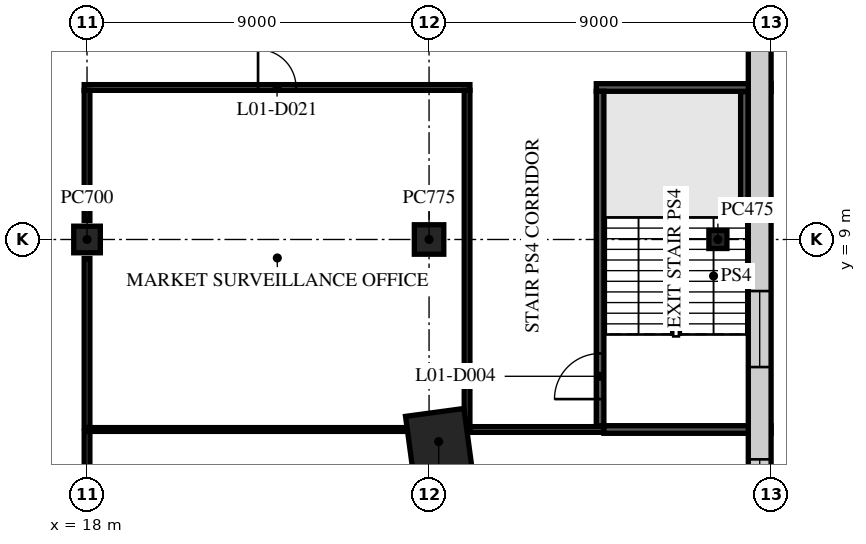
"""IFC4 building model, lengths in metres.
Left out: names, types, materials, properties, quantities, classifications, styles, units other than length and angle.
Written with IfcOpenShell. Run it as: python <this file> out.ifc"""

import sys

from ifc_helpers import new_model, si_unit, direction, frame, frame_2d, origin, origin_2d, place, context, subcontext, project, spatial, rectangle, extrude, element, fill, save


model = new_model("IFC4")
c1 = context("Model", 3, precision=1e-05, world=origin(), true_north=direction((0.0, 1.0)))
c2 = subcontext(c1, "Body", "Model", "MODEL_VIEW")
j1 = project(units=[si_unit("LENGTHUNIT", "METRE"), si_unit("PLANEANGLEUNIT", "RADIAN")], contexts=[c1])
p1 = place(None, origin())
s1 = spatial("IfcSite", under=j1, at=p1, CompositionType="ELEMENT")
p2 = place(p1, origin())
s2 = spatial("IfcBuilding", under=s1, at=p2, CompositionType="ELEMENT")
p3 = place(p2, frame((0.0, 0.0, 4.5)))
s3 = spatial("IfcBuildingStorey", under=s2, at=p3, CompositionType="ELEMENT", Elevation=4.5)
p4 = place(p3, frame((18.0, 9.0, 0.0), z_axis=(0.0, 0.0, 1.0), x_axis=(1.0, 0.0, 0.0)))
e1 = element("IfcColumn", 1, at=p4, inside=s3, PredefinedType="COLUMN", context=c2, shape_type="SweptSolid", body=[
    extrude(rectangle(XDim=0.7, YDim=0.7, at=origin_2d()), origin(), (0.0, 0.0, 1.0), 4.5),
])
p5 = place(p3, frame((27.0, 9.0, 0.0), z_axis=(0.0, 0.0, 1.0), x_axis=(1.0, 0.0, 0.0)))
e2 = element("IfcColumn", 2, at=p5, inside=s3, PredefinedType="COLUMN", context=c2, shape_type="SweptSolid", body=[
    extrude(rectangle(XDim=0.775, YDim=0.775, at=origin_2d()), origin(), (0.0, 0.0, 1.0), 4.5),
])
p6 = place(p3, frame((34.6, 9.0, 0.0), z_axis=(0.0, 0.0, 1.0), x_axis=(1.0, 0.0, 0.0)))
e3 = element("IfcColumn", 3, at=p6, inside=s3, PredefinedType="COLUMN", context=c2, shape_type="SweptSolid", body=[
    extrude(rectangle(XDim=0.475, YDim=0.475, at=origin_2d()), origin(), (0.0, 0.0, 1.0), 4.5),
])
p7 = place(p3, frame((27.253, 3.681, 0.0), z_axis=(0.0, 0.0, 1.0), x_axis=(0.991001197216, 0.133853005627, 0.0)))
e4 = element("IfcColumn", 4, at=p7, inside=s3, PredefinedType="COLUMN", context=c2, shape_type="SweptSolid", body=[
    extrude(rectangle(XDim=1.55, YDim=1.55, at=origin_2d()), origin(), (0.0, 0.0, 1.0), 4.5),
])
p8 = place(p3, frame((18.075, 4.0, 0.0), z_axis=(0.0, 0.0, 1.0), x_axis=(1.0, 0.0, 0.0)))
e5 = element("IfcWall", 5, at=p8, inside=s3, PredefinedType="PARTITIONING", context=c2, shape_type="SweptSolid", body=[
    extrude(rectangle(XDim=8.447, YDim=0.1, at=frame_2d((4.223, 0.0))), origin(), (0.0, 0.0, 1.0), 4.1),
])
p9 = place(p3, frame((28.075, 4.0, 0.0), z_axis=(0.0, 0.0, 1.0), x_axis=(1.0, 0.0, 0.0)))
e6 = element("IfcWall", 6, at=p9, inside=s3, PredefinedType="PARTITIONING", context=c2, shape_type="SweptSolid", body=[
    extrude(rectangle(XDim=3.525, YDim=0.15, at=frame_2d((1.763, 0.0))), origin(), (0.0, 0.0, 1.0), 4.1),
])
p10 = place(p3, frame((31.6, 4.0, 0.0), z_axis=(0.0, 0.0, 1.0), x_axis=(1.0, 0.0, 0.0)))
e7 = element("IfcWall", 7, at=p10, inside=s3, PredefinedType="PARTITIONING", context=c2, shape_type="SweptSolid", body=[
    extrude(rectangle(XDim=4.4, YDim=0.2, at=frame_2d((2.2, 0.0))), origin(), (0.0, 0.0, 1.0), 4.1),
])
p11 = place(p3, frame((17.925, 13.0, 0.0), z_axis=(0.0, 0.0, 1.0), x_axis=(1.0, 0.0, 0.0)))
e8 = element("IfcWall", 8, at=p11, inside=s3, PredefinedType="PARTITIONING", context=c2, shape_type="SweptSolid", body=[
    extrude(rectangle(XDim=10.15, YDim=0.15, at=frame_2d((5.075, 0.0))), origin(), (0.0, 0.0, 1.0), 4.1),
])
p12 = place(p11, frame((4.575, 0.0, 0.0)))
e9 = element("IfcOpeningElement", 9, at=p12, cuts=e8, PredefinedType="OPENING", context=c2, shape_type="SweptSolid", body=[
    extrude(rectangle(XDim=1.0, YDim=2.1, at=frame_2d((0.5, 1.05))), frame((0.0, 0.085, 0.0), z_axis=(0.0, -1.0, 0.0), x_axis=(1.0, 0.0, 0.0)), (0.0, 0.0, 1.0), 0.17),
])
p13 = place(p3, frame((31.4, 13.0, 0.0), z_axis=(0.0, 0.0, 1.0), x_axis=(1.0, 0.0, 0.0)))
e10 = element("IfcWall", 10, at=p13, inside=s3, PredefinedType="PARTITIONING", context=c2, shape_type="SweptSolid", body=[
    extrude(rectangle(XDim=4.6, YDim=0.2, at=frame_2d((2.3, 0.0))), origin(), (0.0, 0.0, 1.0), 4.1),
])
p14 = place(p3, frame((18.0, 0.5, 0.0), z_axis=(0.0, 0.0, 1.0), x_axis=(0.0, 1.0, 0.0)))
e11 = element("IfcWall", 11, at=p14, inside=s3, PredefinedType="PARTITIONING", context=c2, shape_type="SweptSolid", body=[
    extrude(rectangle(XDim=3.45, YDim=0.15, at=frame_2d((1.725, 0.0))), origin(), (0.0, 0.0, 1.0), 4.1),
])
p15 = place(p3, frame((18.0, 4.05, 0.0), z_axis=(0.0, 0.0, 1.0), x_axis=(0.0, 1.0, 0.0)))
e12 = element("IfcWall", 12, at=p15, inside=s3, PredefinedType="PARTITIONING", context=c2, shape_type="SweptSolid", body=[
    extrude(rectangle(XDim=4.45, YDim=0.15, at=frame_2d((2.225, 0.0))), origin(), (0.0, 0.0, 1.0), 4.1),
])
p16 = place(p3, frame((18.0, 9.5, 0.0), z_axis=(0.0, 0.0, 1.0), x_axis=(0.0, 1.0, 0.0)))
e13 = element("IfcWall", 13, at=p16, inside=s3, PredefinedType="PARTITIONING", context=c2, shape_type="SweptSolid", body=[
    extrude(rectangle(XDim=3.425, YDim=0.15, at=frame_2d((1.712, 0.0))), origin(), (0.0, 0.0, 1.0), 4.1),
])
p17 = place(p3, frame((28.0, 4.075, 0.0), z_axis=(0.0, 0.0, 1.0), x_axis=(0.0, 1.0, 0.0)))
e14 = element("IfcWall", 14, at=p17, inside=s3, PredefinedType="PARTITIONING", context=c2, shape_type="SweptSolid", body=[
    extrude(rectangle(XDim=8.85, YDim=0.15, at=frame_2d((4.425, 0.0))), origin(), (0.0, 0.0, 1.0), 4.1),
])
p18 = place(p3, frame((31.5, 4.1, 0.0), z_axis=(0.0, 0.0, 1.0), x_axis=(0.0, 1.0, 0.0)))
e15 = element("IfcWall", 15, at=p18, inside=s3, PredefinedType="PARTITIONING", context=c2, shape_type="SweptSolid", body=[
    extrude(rectangle(XDim=8.8, YDim=0.2, at=frame_2d((4.4, 0.0))), origin(), (0.0, 0.0, 1.0), 4.1),
])
p19 = place(p18, frame((0.7, 0.0, 0.0)))
e16 = element("IfcOpeningElement", 16, at=p19, cuts=e15, PredefinedType="OPENING", context=c2, shape_type="SweptSolid", body=[
    extrude(rectangle(XDim=1.2, YDim=2.1, at=frame_2d((0.6, 1.05))), frame((0.0, 0.11, 0.0), z_axis=(0.0, -1.0, 0.0), x_axis=(1.0, 0.0, 0.0)), (0.0, 0.0, 1.0), 0.22),
])
p20 = place(p3, frame((35.298, 9.581, 0.0), z_axis=(0.0, 0.0, 1.0), x_axis=(0.0, 1.0, 0.0)))
e17 = element("IfcWall", 17, at=p20, inside=s3, PredefinedType="PARTITIONING", context=c2, shape_type="SweptSolid", body=[
    extrude(rectangle(XDim=3.309, YDim=0.2, at=frame_2d((1.655, 0.0))), origin(), (0.0, 0.0, 1.0), 4.1),
])
p21 = place(p3, frame((35.7, -30.876, 0.0), z_axis=(0.0, 0.0, 1.0), x_axis=(0.0, 1.0, 0.0)))
e18 = element("IfcWall", 18, at=p21, inside=s3, PredefinedType="STANDARD", context=c2, shape_type="SweptSolid", body=[
    extrude(rectangle(XDim=61.751, YDim=0.6, at=frame_2d((30.876, 0.0))), origin(), (0.0, 0.0, 1.0), 4.1),
])
p22 = place(p21, frame((1.152, 0.0, 0.9)))
e19 = element("IfcOpeningElement", 19, at=p22, cuts=e18, PredefinedType="OPENING", context=c2, shape_type="SweptSolid", body=[
    extrude(rectangle(XDim=2.0, YDim=3.0, at=frame_2d((1.0, 1.5))), frame((0.0, 0.31, 0.0), z_axis=(0.0, -1.0, 0.0), x_axis=(1.0, 0.0, 0.0)), (0.0, 0.0, 1.0), 0.62),
])
p23 = place(p21, frame((5.519, 0.0, 0.9)))
e20 = element("IfcOpeningElement", 20, at=p23, cuts=e18, PredefinedType="OPENING", context=c2, shape_type="SweptSolid", body=[
    extrude(rectangle(XDim=2.0, YDim=3.0, at=frame_2d((1.0, 1.5))), frame((0.0, 0.31, 0.0), z_axis=(0.0, -1.0, 0.0), x_axis=(1.0, 0.0, 0.0)), (0.0, 0.0, 1.0), 0.62),
])
p24 = place(p21, frame((9.947, 0.0, 0.9)))
e21 = element("IfcOpeningElement", 21, at=p24, cuts=e18, PredefinedType="OPENING", context=c2, shape_type="SweptSolid", body=[
    extrude(rectangle(XDim=2.0, YDim=3.0, at=frame_2d((1.0, 1.5))), frame((0.0, 0.31, 0.0), z_axis=(0.0, -1.0, 0.0), x_axis=(1.0, 0.0, 0.0)), (0.0, 0.0, 1.0), 0.62),
])
p25 = place(p21, frame((14.376, 0.0, 0.9)))
e22 = element("IfcOpeningElement", 22, at=p25, cuts=e18, PredefinedType="OPENING", context=c2, shape_type="SweptSolid", body=[
    extrude(rectangle(XDim=2.0, YDim=3.0, at=frame_2d((1.0, 1.5))), frame((0.0, 0.31, 0.0), z_axis=(0.0, -1.0, 0.0), x_axis=(1.0, 0.0, 0.0)), (0.0, 0.0, 1.0), 0.62),
])
p26 = place(p21, frame((18.804, 0.0, 0.9)))
e23 = element("IfcOpeningElement", 23, at=p26, cuts=e18, PredefinedType="OPENING", context=c2, shape_type="SweptSolid", body=[
    extrude(rectangle(XDim=2.0, YDim=3.0, at=frame_2d((1.0, 1.5))), frame((0.0, 0.31, 0.0), z_axis=(0.0, -1.0, 0.0), x_axis=(1.0, 0.0, 0.0)), (0.0, 0.0, 1.0), 0.62),
])
p27 = place(p21, frame((23.233, 0.0, 0.9)))
e24 = element("IfcOpeningElement", 24, at=p27, cuts=e18, PredefinedType="OPENING", context=c2, shape_type="SweptSolid", body=[
    extrude(rectangle(XDim=2.0, YDim=3.0, at=frame_2d((1.0, 1.5))), frame((0.0, 0.31, 0.0), z_axis=(0.0, -1.0, 0.0), x_axis=(1.0, 0.0, 0.0)), (0.0, 0.0, 1.0), 0.62),
])
p28 = place(p21, frame((27.662, 0.0, 0.9)))
e25 = element("IfcOpeningElement", 25, at=p28, cuts=e18, PredefinedType="OPENING", context=c2, shape_type="SweptSolid", body=[
    extrude(rectangle(XDim=2.0, YDim=3.0, at=frame_2d((1.0, 1.5))), frame((0.0, 0.31, 0.0), z_axis=(0.0, -1.0, 0.0), x_axis=(1.0, 0.0, 0.0)), (0.0, 0.0, 1.0), 0.62),
])
p29 = place(p21, frame((32.09, 0.0, 0.9)))
e26 = element("IfcOpeningElement", 26, at=p29, cuts=e18, PredefinedType="OPENING", context=c2, shape_type="SweptSolid", body=[
    extrude(rectangle(XDim=2.0, YDim=3.0, at=frame_2d((1.0, 1.5))), frame((0.0, 0.31, 0.0), z_axis=(0.0, -1.0, 0.0), x_axis=(1.0, 0.0, 0.0)), (0.0, 0.0, 1.0), 0.62),
])
p30 = place(p21, frame((36.519, 0.0, 0.9)))
e27 = element("IfcOpeningElement", 27, at=p30, cuts=e18, PredefinedType="OPENING", context=c2, shape_type="SweptSolid", body=[
    extrude(rectangle(XDim=2.0, YDim=3.0, at=frame_2d((1.0, 1.5))), frame((0.0, 0.31, 0.0), z_axis=(0.0, -1.0, 0.0), x_axis=(1.0, 0.0, 0.0)), (0.0, 0.0, 1.0), 0.62),
])
p31 = place(p21, frame((45.376, 0.0, 0.9)))
e28 = element("IfcOpeningElement", 28, at=p31, cuts=e18, PredefinedType="OPENING", context=c2, shape_type="SweptSolid", body=[
    extrude(rectangle(XDim=2.0, YDim=3.0, at=frame_2d((1.0, 1.5))), frame((0.0, 0.31, 0.0), z_axis=(0.0, -1.0, 0.0), x_axis=(1.0, 0.0, 0.0)), (0.0, 0.0, 1.0), 0.62),
])
p32 = place(p21, frame((49.804, 0.0, 0.9)))
e29 = element("IfcOpeningElement", 29, at=p32, cuts=e18, PredefinedType="OPENING", context=c2, shape_type="SweptSolid", body=[
    extrude(rectangle(XDim=2.0, YDim=3.0, at=frame_2d((1.0, 1.5))), frame((0.0, 0.31, 0.0), z_axis=(0.0, -1.0, 0.0), x_axis=(1.0, 0.0, 0.0)), (0.0, 0.0, 1.0), 0.62),
])
p33 = place(p21, frame((58.599, 0.0, 0.9)))
e30 = element("IfcOpeningElement", 30, at=p33, cuts=e18, PredefinedType="OPENING", context=c2, shape_type="SweptSolid", body=[
    extrude(rectangle(XDim=2.0, YDim=3.0, at=frame_2d((1.0, 1.5))), frame((0.0, 0.31, 0.0), z_axis=(0.0, -1.0, 0.0), x_axis=(1.0, 0.0, 0.0)), (0.0, 0.0, 1.0), 0.62),
])
p34 = place(p19, frame((1.2, 0.0, 0.0), z_axis=(0.0, 0.0, 1.0), x_axis=(-1.0, 0.0, 0.0)))
e31 = element("IfcDoor", 31, at=p34, inside=s3, OperationType="SINGLE_SWING_RIGHT", PredefinedType="DOOR", context=c2, shape_type="SweptSolid", body=[
    extrude(rectangle(XDim=1.2, YDim=2.1, at=frame_2d((0.6, 1.05))), frame((0.0, 0.025, 0.0), z_axis=(0.0, -1.0, 0.0), x_axis=(1.0, 0.0, 0.0)), (0.0, 0.0, 1.0), 0.05),
])
fill(e16, e31)
p35 = place(p12, origin())
e32 = element("IfcDoor", 32, at=p35, inside=s3, OperationType="SINGLE_SWING_LEFT", PredefinedType="DOOR", context=c2, shape_type="SweptSolid", body=[
    extrude(rectangle(XDim=1.0, YDim=2.1, at=frame_2d((0.5, 1.05))), frame((0.0, 0.025, 0.0), z_axis=(0.0, -1.0, 0.0), x_axis=(1.0, 0.0, 0.0)), (0.0, 0.0, 1.0), 0.05),
])
fill(e9, e32)
p36 = place(p29, origin())
e33 = element("IfcWindow", 33, at=p36, inside=s3, PartitioningType="SINGLE_PANEL", PredefinedType="WINDOW", context=c2, shape_type="SweptSolid", body=[
    extrude(rectangle(XDim=2.0, YDim=3.0, at=frame_2d((1.0, 1.5))), frame((0.0, 0.03, 0.0), z_axis=(0.0, -1.0, 0.0), x_axis=(1.0, 0.0, 0.0)), (0.0, 0.0, 1.0), 0.06),
])
fill(e26, e33)
p37 = place(p30, origin())
e34 = element("IfcWindow", 34, at=p37, inside=s3, PartitioningType="SINGLE_PANEL", PredefinedType="WINDOW", context=c2, shape_type="SweptSolid", body=[
    extrude(rectangle(XDim=2.0, YDim=3.0, at=frame_2d((1.0, 1.5))), frame((0.0, 0.03, 0.0), z_axis=(0.0, -1.0, 0.0), x_axis=(1.0, 0.0, 0.0)), (0.0, 0.0, 1.0), 0.06),
])
fill(e27, e34)
save(model, sys.argv[1])
